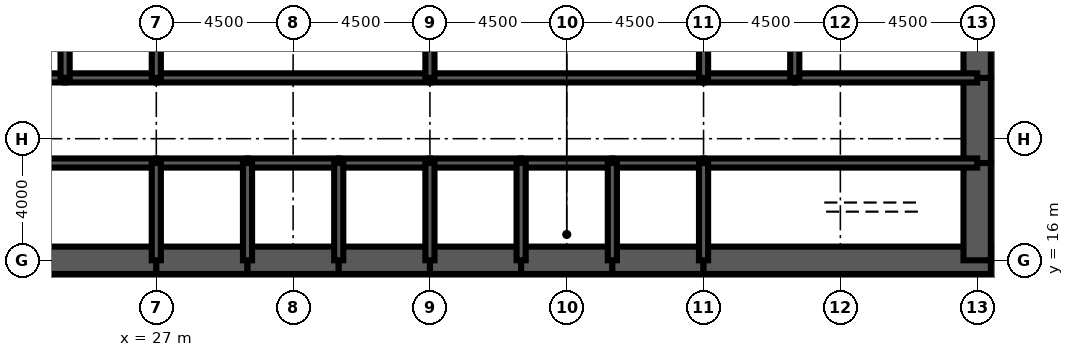
"""IFC4 building model, lengths in metres.
Left out: names, types, materials, properties, quantities, classifications, styles, units other than length and angle.
Written with IfcOpenShell. Run it as: python <this file> out.ifc"""

import sys

from ifc_helpers import new_model, si_unit, direction, frame, frame_2d, origin, place, context, subcontext, project, spatial, rectangle, extrude, element, fill, save


model = new_model("IFC4")
c1 = context("Model", 3, precision=1e-05, world=origin(), true_north=direction((0.0, 1.0)))
c2 = subcontext(c1, "Body", "Model", "MODEL_VIEW")
j1 = project(units=[si_unit("LENGTHUNIT", "METRE"), si_unit("PLANEANGLEUNIT", "RADIAN")], contexts=[c1])
p1 = place(None, origin())
s1 = spatial("IfcSite", under=j1, at=p1, CompositionType="ELEMENT")
p2 = place(p1, origin())
s2 = spatial("IfcBuilding", under=s1, at=p2, CompositionType="ELEMENT")
p3 = place(p2, frame((0.0, 0.0, 134.1)))
s3 = spatial("IfcBuildingStorey", under=s2, at=p3, CompositionType="ELEMENT", Elevation=134.1)
p4 = place(p3, frame((17.55, 16.0, 0.0), z_axis=(0.0, 0.0, 1.0), x_axis=(1.0, 0.0, 0.0)))
e1 = element("IfcWall", 1, at=p4, inside=s3, PredefinedType="SHEAR", context=c2, shape_type="SweptSolid", body=[
    extrude(rectangle(XDim=9.45, YDim=0.9, at=frame_2d((4.725, 0.0))), origin(), (0.0, 0.0, 1.0), 4.2),
])
for number, where, z_axis, x_axis in (
    (2, (27.0, 16.0, 0.0), (0.0, 0.0, 1.0), (1.0, 0.0, 0.0)),
    (3, (30.0, 16.0, 0.0), (0.0, 0.0, 1.0), (1.0, 0.0, 0.0)),
    (4, (33.0, 16.0, 0.0), (0.0, 0.0, 1.0), (1.0, 0.0, 0.0)),
    (5, (36.0, 16.0, 0.0), (0.0, 0.0, 1.0), (1.0, 0.0, 0.0)),
    (6, (39.0, 16.0, 0.0), (0.0, 0.0, 1.0), (1.0, 0.0, 0.0)),
    (7, (42.0, 16.0, 0.0), (0.0, 0.0, 1.0), (1.0, 0.0, 0.0)),
):
    element("IfcWall", number, at=place(p3, frame(where, z_axis=z_axis, x_axis=x_axis)), inside=s3, PredefinedType="SHEAR", context=c2, shape_type="SweptSolid", body=[
        extrude(rectangle(XDim=3.0, YDim=0.9, at=frame_2d((1.5, 0.0))), origin(), (0.0, 0.0, 1.0), 4.2),
    ])
p5 = place(p3, frame((45.0, 16.0, 0.0), z_axis=(0.0, 0.0, 1.0), x_axis=(1.0, 0.0, 0.0)))
e8 = element("IfcWall", 8, at=p5, inside=s3, PredefinedType="SHEAR", context=c2, shape_type="SweptSolid", body=[
    extrude(rectangle(XDim=9.45, YDim=0.9, at=frame_2d((4.725, 0.0))), origin(), (0.0, 0.0, 1.0), 4.2),
])
p6 = place(p3, frame((54.0, 16.0, 0.0), z_axis=(0.0, 0.0, 1.0), x_axis=(0.0, 1.0, 0.0)))
e9 = element("IfcWall", 9, at=p6, inside=s3, PredefinedType="SHEAR", context=c2, shape_type="SweptSolid", body=[
    extrude(rectangle(XDim=3.2, YDim=0.9, at=frame_2d((1.6, 0.0))), origin(), (0.0, 0.0, 1.0), 4.2),
])
p7 = place(p3, frame((54.0, 19.2, 0.0), z_axis=(0.0, 0.0, 1.0), x_axis=(0.0, 1.0, 0.0)))
e10 = element("IfcWall", 10, at=p7, inside=s3, PredefinedType="SHEAR", context=c2, shape_type="SweptSolid", body=[
    extrude(rectangle(XDim=2.8, YDim=0.9, at=frame_2d((1.4, 0.0))), origin(), (0.0, 0.0, 1.0), 4.2),
])
p8 = place(p7, frame((0.4, 0.0, 0.0)))
e11 = element("IfcOpeningElement", 11, at=p8, cuts=e10, PredefinedType="OPENING", context=c2, shape_type="SweptSolid", body=[
    extrude(rectangle(XDim=1.8, YDim=2.1, at=frame_2d((0.9, 1.05))), frame((0.0, 0.46, 0.0), z_axis=(0.0, -1.0, 0.0), x_axis=(1.0, 0.0, 0.0)), (0.0, 0.0, 1.0), 0.92),
])
p9 = place(p3, frame((54.0, 22.0, 0.0), z_axis=(0.0, 0.0, 1.0), x_axis=(0.0, 1.0, 0.0)))
e12 = element("IfcWall", 12, at=p9, inside=s3, PredefinedType="SHEAR", context=c2, shape_type="SweptSolid", body=[
    extrude(rectangle(XDim=4.0, YDim=0.9, at=frame_2d((2.0, 0.0))), origin(), (0.0, 0.0, 1.0), 4.2),
])
p10 = place(p3, frame((18.0, 19.2, 0.0), z_axis=(0.0, 0.0, 1.0), x_axis=(1.0, 0.0, 0.0)))
e13 = element("IfcWall", 13, at=p10, inside=s3, PredefinedType="SOLIDWALL", context=c2, shape_type="SweptSolid", body=[
    extrude(rectangle(XDim=9.0, YDim=0.3, at=frame_2d((4.5, 0.0))), origin(), (0.0, 0.0, 1.0), 4.2),
])
p11 = place(p10, frame((0.65, 0.0, 0.0)))
e14 = element("IfcOpeningElement", 14, at=p11, cuts=e13, PredefinedType="OPENING", context=c2, shape_type="SweptSolid", body=[
    extrude(rectangle(XDim=1.0, YDim=2.1, at=frame_2d((0.5, 1.05))), frame((0.0, 0.16, 0.0), z_axis=(0.0, -1.0, 0.0), x_axis=(1.0, 0.0, 0.0)), (0.0, 0.0, 1.0), 0.32),
])
p12 = place(p3, frame((27.0, 19.2, 0.0), z_axis=(0.0, 0.0, 1.0), x_axis=(1.0, 0.0, 0.0)))
e15 = element("IfcWall", 15, at=p12, inside=s3, PredefinedType="SOLIDWALL", context=c2, shape_type="SweptSolid", body=[
    extrude(rectangle(XDim=3.0, YDim=0.3, at=frame_2d((1.5, 0.0))), origin(), (0.0, 0.0, 1.0), 4.2),
])
p13 = place(p12, frame((0.95, 0.0, 0.0)))
e16 = element("IfcOpeningElement", 16, at=p13, cuts=e15, PredefinedType="OPENING", context=c2, shape_type="SweptSolid", body=[
    extrude(rectangle(XDim=1.1, YDim=2.2, at=frame_2d((0.55, 1.1))), frame((0.0, 0.16, 0.0), z_axis=(0.0, -1.0, 0.0), x_axis=(1.0, 0.0, 0.0)), (0.0, 0.0, 1.0), 0.32),
])
p14 = place(p3, frame((30.0, 19.2, 0.0), z_axis=(0.0, 0.0, 1.0), x_axis=(1.0, 0.0, 0.0)))
e17 = element("IfcWall", 17, at=p14, inside=s3, PredefinedType="SOLIDWALL", context=c2, shape_type="SweptSolid", body=[
    extrude(rectangle(XDim=3.0, YDim=0.3, at=frame_2d((1.5, 0.0))), origin(), (0.0, 0.0, 1.0), 4.2),
])
p15 = place(p14, frame((0.95, 0.0, 0.0)))
e18 = element("IfcOpeningElement", 18, at=p15, cuts=e17, PredefinedType="OPENING", context=c2, shape_type="SweptSolid", body=[
    extrude(rectangle(XDim=1.1, YDim=2.2, at=frame_2d((0.55, 1.1))), frame((0.0, 0.16, 0.0), z_axis=(0.0, -1.0, 0.0), x_axis=(1.0, 0.0, 0.0)), (0.0, 0.0, 1.0), 0.32),
])
p16 = place(p3, frame((33.0, 19.2, 0.0), z_axis=(0.0, 0.0, 1.0), x_axis=(1.0, 0.0, 0.0)))
e19 = element("IfcWall", 19, at=p16, inside=s3, PredefinedType="SOLIDWALL", context=c2, shape_type="SweptSolid", body=[
    extrude(rectangle(XDim=3.0, YDim=0.3, at=frame_2d((1.5, 0.0))), origin(), (0.0, 0.0, 1.0), 4.2),
])
p17 = place(p16, frame((0.95, 0.0, 0.0)))
e20 = element("IfcOpeningElement", 20, at=p17, cuts=e19, PredefinedType="OPENING", context=c2, shape_type="SweptSolid", body=[
    extrude(rectangle(XDim=1.1, YDim=2.2, at=frame_2d((0.55, 1.1))), frame((0.0, 0.16, 0.0), z_axis=(0.0, -1.0, 0.0), x_axis=(1.0, 0.0, 0.0)), (0.0, 0.0, 1.0), 0.32),
])
p18 = place(p3, frame((36.0, 19.2, 0.0), z_axis=(0.0, 0.0, 1.0), x_axis=(1.0, 0.0, 0.0)))
e21 = element("IfcWall", 21, at=p18, inside=s3, PredefinedType="SOLIDWALL", context=c2, shape_type="SweptSolid", body=[
    extrude(rectangle(XDim=3.0, YDim=0.3, at=frame_2d((1.5, 0.0))), origin(), (0.0, 0.0, 1.0), 4.2),
])
p19 = place(p18, frame((0.95, 0.0, 0.0)))
e22 = element("IfcOpeningElement", 22, at=p19, cuts=e21, PredefinedType="OPENING", context=c2, shape_type="SweptSolid", body=[
    extrude(rectangle(XDim=1.1, YDim=2.2, at=frame_2d((0.55, 1.1))), frame((0.0, 0.16, 0.0), z_axis=(0.0, -1.0, 0.0), x_axis=(1.0, 0.0, 0.0)), (0.0, 0.0, 1.0), 0.32),
])
p20 = place(p3, frame((39.0, 19.2, 0.0), z_axis=(0.0, 0.0, 1.0), x_axis=(1.0, 0.0, 0.0)))
e23 = element("IfcWall", 23, at=p20, inside=s3, PredefinedType="SOLIDWALL", context=c2, shape_type="SweptSolid", body=[
    extrude(rectangle(XDim=3.0, YDim=0.3, at=frame_2d((1.5, 0.0))), origin(), (0.0, 0.0, 1.0), 4.2),
])
p21 = place(p20, frame((1.0, 0.0, 0.0)))
e24 = element("IfcOpeningElement", 24, at=p21, cuts=e23, PredefinedType="OPENING", context=c2, shape_type="SweptSolid", body=[
    extrude(rectangle(XDim=1.0, YDim=2.1, at=frame_2d((0.5, 1.05))), frame((0.0, 0.16, 0.0), z_axis=(0.0, -1.0, 0.0), x_axis=(1.0, 0.0, 0.0)), (0.0, 0.0, 1.0), 0.32),
])
p22 = place(p3, frame((42.0, 19.2, 0.0), z_axis=(0.0, 0.0, 1.0), x_axis=(1.0, 0.0, 0.0)))
e25 = element("IfcWall", 25, at=p22, inside=s3, PredefinedType="SOLIDWALL", context=c2, shape_type="SweptSolid", body=[
    extrude(rectangle(XDim=3.0, YDim=0.3, at=frame_2d((1.5, 0.0))), origin(), (0.0, 0.0, 1.0), 4.2),
])
p23 = place(p3, frame((45.0, 19.2, 0.0), z_axis=(0.0, 0.0, 1.0), x_axis=(1.0, 0.0, 0.0)))
e26 = element("IfcWall", 26, at=p23, inside=s3, PredefinedType="SOLIDWALL", context=c2, shape_type="SweptSolid", body=[
    extrude(rectangle(XDim=9.0, YDim=0.3, at=frame_2d((4.5, 0.0))), origin(), (0.0, 0.0, 1.0), 4.2),
])
p24 = place(p23, frame((7.35, 0.0, 0.0)))
e27 = element("IfcOpeningElement", 27, at=p24, cuts=e26, PredefinedType="OPENING", context=c2, shape_type="SweptSolid", body=[
    extrude(rectangle(XDim=1.0, YDim=2.1, at=frame_2d((0.5, 1.05))), frame((0.0, 0.16, 0.0), z_axis=(0.0, -1.0, 0.0), x_axis=(1.0, 0.0, 0.0)), (0.0, 0.0, 1.0), 0.32),
])
p25 = place(p3, frame((18.0, 22.0, 0.0), z_axis=(0.0, 0.0, 1.0), x_axis=(1.0, 0.0, 0.0)))
e28 = element("IfcWall", 28, at=p25, inside=s3, PredefinedType="SOLIDWALL", context=c2, shape_type="SweptSolid", body=[
    extrude(rectangle(XDim=6.0, YDim=0.3, at=frame_2d((3.0, 0.0))), origin(), (0.0, 0.0, 1.0), 4.2),
])
p26 = place(p25, frame((4.4, 0.0, 0.0)))
e29 = element("IfcOpeningElement", 29, at=p26, cuts=e28, PredefinedType="OPENING", context=c2, shape_type="SweptSolid", body=[
    extrude(rectangle(XDim=1.0, YDim=2.1, at=frame_2d((0.5, 1.05))), frame((0.0, 0.16, 0.0), z_axis=(0.0, -1.0, 0.0), x_axis=(1.0, 0.0, 0.0)), (0.0, 0.0, 1.0), 0.32),
])
p27 = place(p25, frame((0.7, 0.0, 0.0)))
e30 = element("IfcOpeningElement", 30, at=p27, cuts=e28, PredefinedType="OPENING", context=c2, shape_type="SweptSolid", body=[
    extrude(rectangle(XDim=1.0, YDim=2.1, at=frame_2d((0.5, 1.05))), frame((0.0, 0.16, 0.0), z_axis=(0.0, -1.0, 0.0), x_axis=(1.0, 0.0, 0.0)), (0.0, 0.0, 1.0), 0.32),
])
p28 = place(p3, frame((24.0, 22.0, 0.0), z_axis=(0.0, 0.0, 1.0), x_axis=(1.0, 0.0, 0.0)))
e31 = element("IfcWall", 31, at=p28, inside=s3, PredefinedType="SOLIDWALL", context=c2, shape_type="SweptSolid", body=[
    extrude(rectangle(XDim=3.0, YDim=0.3, at=frame_2d((1.5, 0.0))), origin(), (0.0, 0.0, 1.0), 4.2),
])
p29 = place(p28, frame((1.0, 0.0, 0.0)))
e32 = element("IfcOpeningElement", 32, at=p29, cuts=e31, PredefinedType="OPENING", context=c2, shape_type="SweptSolid", body=[
    extrude(rectangle(XDim=1.0, YDim=2.1, at=frame_2d((0.5, 1.05))), frame((0.0, 0.16, 0.0), z_axis=(0.0, -1.0, 0.0), x_axis=(1.0, 0.0, 0.0)), (0.0, 0.0, 1.0), 0.32),
])
p30 = place(p3, frame((27.0, 22.0, 0.0), z_axis=(0.0, 0.0, 1.0), x_axis=(1.0, 0.0, 0.0)))
e33 = element("IfcWall", 33, at=p30, inside=s3, PredefinedType="SOLIDWALL", context=c2, shape_type="SweptSolid", body=[
    extrude(rectangle(XDim=9.0, YDim=0.3, at=frame_2d((4.5, 0.0))), origin(), (0.0, 0.0, 1.0), 4.2),
])
p31 = place(p30, frame((4.0, 0.0, 0.0)))
e34 = element("IfcOpeningElement", 34, at=p31, cuts=e33, PredefinedType="OPENING", context=c2, shape_type="SweptSolid", body=[
    extrude(rectangle(XDim=1.0, YDim=2.1, at=frame_2d((0.5, 1.05))), frame((0.0, 0.16, 0.0), z_axis=(0.0, -1.0, 0.0), x_axis=(1.0, 0.0, 0.0)), (0.0, 0.0, 1.0), 0.32),
])
p32 = place(p3, frame((36.0, 22.0, 0.0), z_axis=(0.0, 0.0, 1.0), x_axis=(1.0, 0.0, 0.0)))
e35 = element("IfcWall", 35, at=p32, inside=s3, PredefinedType="SOLIDWALL", context=c2, shape_type="SweptSolid", body=[
    extrude(rectangle(XDim=9.0, YDim=0.3, at=frame_2d((4.5, 0.0))), origin(), (0.0, 0.0, 1.0), 4.2),
])
p33 = place(p32, frame((4.0, 0.0, 0.0)))
e36 = element("IfcOpeningElement", 36, at=p33, cuts=e35, PredefinedType="OPENING", context=c2, shape_type="SweptSolid", body=[
    extrude(rectangle(XDim=1.0, YDim=2.1, at=frame_2d((0.5, 1.05))), frame((0.0, 0.16, 0.0), z_axis=(0.0, -1.0, 0.0), x_axis=(1.0, 0.0, 0.0)), (0.0, 0.0, 1.0), 0.32),
])
p34 = place(p3, frame((45.0, 22.0, 0.0), z_axis=(0.0, 0.0, 1.0), x_axis=(1.0, 0.0, 0.0)))
e37 = element("IfcWall", 37, at=p34, inside=s3, PredefinedType="SOLIDWALL", context=c2, shape_type="SweptSolid", body=[
    extrude(rectangle(XDim=3.0, YDim=0.3, at=frame_2d((1.5, 0.0))), origin(), (0.0, 0.0, 1.0), 4.2),
])
p35 = place(p34, frame((1.0, 0.0, 0.0)))
e38 = element("IfcOpeningElement", 38, at=p35, cuts=e37, PredefinedType="OPENING", context=c2, shape_type="SweptSolid", body=[
    extrude(rectangle(XDim=1.0, YDim=2.1, at=frame_2d((0.5, 1.05))), frame((0.0, 0.16, 0.0), z_axis=(0.0, -1.0, 0.0), x_axis=(1.0, 0.0, 0.0)), (0.0, 0.0, 1.0), 0.32),
])
p36 = place(p3, frame((48.0, 22.0, 0.0), z_axis=(0.0, 0.0, 1.0), x_axis=(1.0, 0.0, 0.0)))
e39 = element("IfcWall", 39, at=p36, inside=s3, PredefinedType="SOLIDWALL", context=c2, shape_type="SweptSolid", body=[
    extrude(rectangle(XDim=6.0, YDim=0.3, at=frame_2d((3.0, 0.0))), origin(), (0.0, 0.0, 1.0), 4.2),
])
p37 = place(p36, frame((2.0, 0.0, 0.0)))
e40 = element("IfcOpeningElement", 40, at=p37, cuts=e39, PredefinedType="OPENING", context=c2, shape_type="SweptSolid", body=[
    extrude(rectangle(XDim=1.0, YDim=2.1, at=frame_2d((0.5, 1.05))), frame((0.0, 0.16, 0.0), z_axis=(0.0, -1.0, 0.0), x_axis=(1.0, 0.0, 0.0)), (0.0, 0.0, 1.0), 0.32),
])
p38 = place(p36, frame((4.0, 0.0, 0.0)))
e41 = element("IfcOpeningElement", 41, at=p38, cuts=e39, PredefinedType="OPENING", context=c2, shape_type="SweptSolid", body=[
    extrude(rectangle(XDim=1.0, YDim=2.1, at=frame_2d((0.5, 1.05))), frame((0.0, 0.16, 0.0), z_axis=(0.0, -1.0, 0.0), x_axis=(1.0, 0.0, 0.0)), (0.0, 0.0, 1.0), 0.32),
])
for number, where, z_axis, x_axis in (
    (42, (27.0, 16.0, 0.0), (0.0, 0.0, 1.0), (0.0, 1.0, 0.0)),
    (43, (30.0, 16.0, 0.0), (0.0, 0.0, 1.0), (0.0, 1.0, 0.0)),
    (44, (33.0, 16.0, 0.0), (0.0, 0.0, 1.0), (0.0, 1.0, 0.0)),
    (45, (36.0, 16.0, 0.0), (0.0, 0.0, 1.0), (0.0, 1.0, 0.0)),
    (46, (39.0, 16.0, 0.0), (0.0, 0.0, 1.0), (0.0, 1.0, 0.0)),
    (47, (42.0, 16.0, 0.0), (0.0, 0.0, 1.0), (0.0, 1.0, 0.0)),
    (48, (45.0, 16.0, 0.0), (0.0, 0.0, 1.0), (0.0, 1.0, 0.0)),
):
    element("IfcWall", number, at=place(p3, frame(where, z_axis=z_axis, x_axis=x_axis)), inside=s3, PredefinedType="SOLIDWALL", context=c2, shape_type="SweptSolid", body=[
        extrude(rectangle(XDim=3.2, YDim=0.3, at=frame_2d((1.6, 0.0))), origin(), (0.0, 0.0, 1.0), 4.2),
    ])
for number, where, z_axis, x_axis in (
    (49, (24.0, 22.0, 0.0), (0.0, 0.0, 1.0), (0.0, 1.0, 0.0)),
    (50, (27.0, 22.0, 0.0), (0.0, 0.0, 1.0), (0.0, 1.0, 0.0)),
    (51, (36.0, 22.0, 0.0), (0.0, 0.0, 1.0), (0.0, 1.0, 0.0)),
    (52, (45.0, 22.0, 0.0), (0.0, 0.0, 1.0), (0.0, 1.0, 0.0)),
    (53, (48.0, 22.0, 0.0), (0.0, 0.0, 1.0), (0.0, 1.0, 0.0)),
):
    element("IfcWall", number, at=place(p3, frame(where, z_axis=z_axis, x_axis=x_axis)), inside=s3, PredefinedType="SOLIDWALL", context=c2, shape_type="SweptSolid", body=[
        extrude(rectangle(XDim=4.0, YDim=0.3, at=frame_2d((2.0, 0.0))), origin(), (0.0, 0.0, 1.0), 4.2),
    ])
p39 = place(p3, frame((39.15, 17.4, 0.0), z_axis=(0.0, 0.0, 1.0), x_axis=(1.0, 0.0, 0.0)))
e54 = element("IfcWall", 54, at=p39, inside=s3, PredefinedType="SOLIDWALL", context=c2, shape_type="SweptSolid", body=[
    extrude(rectangle(XDim=2.7, YDim=0.3, at=frame_2d((1.35, 0.0))), origin(), (0.0, 0.0, 1.0), 4.04),
])
p40 = place(p39, frame((0.85, 0.0, 0.0)))
e55 = element("IfcOpeningElement", 55, at=p40, cuts=e54, PredefinedType="OPENING", context=c2, shape_type="SweptSolid", body=[
    extrude(rectangle(XDim=1.0, YDim=2.1, at=frame_2d((0.5, 1.05))), frame((0.0, 0.16, 0.0), z_axis=(0.0, -1.0, 0.0), x_axis=(1.0, 0.0, 0.0)), (0.0, 0.0, 1.0), 0.32),
])
p41 = place(p3, frame((51.375, 22.15, 0.0), z_axis=(0.0, 0.0, 1.0), x_axis=(0.0, 1.0, 0.0)))
e56 = element("IfcWall", 56, at=p41, inside=s3, PredefinedType="PARTITIONING", context=c2, shape_type="SweptSolid", body=[
    extrude(rectangle(XDim=3.7, YDim=0.15, at=frame_2d((1.85, 0.0))), origin(), (0.0, 0.0, 1.0), 3.0),
])
p42 = place(p3, frame((24.5, 19.35, 0.0), z_axis=(0.0, 0.0, 1.0), x_axis=(0.0, 1.0, 0.0)))
e57 = element("IfcWall", 57, at=p42, inside=s3, PredefinedType="PARTITIONING", context=c2, shape_type="SweptSolid", body=[
    extrude(rectangle(XDim=2.5, YDim=0.15, at=frame_2d((1.25, 0.0))), origin(), (0.0, 0.0, 1.0), 3.0),
])
p43 = place(p42, frame((1.15, 0.0, 0.0)))
e58 = element("IfcOpeningElement", 58, at=p43, cuts=e57, PredefinedType="OPENING", context=c2, shape_type="SweptSolid", body=[
    extrude(rectangle(XDim=1.0, YDim=2.1, at=frame_2d((0.5, 1.05))), frame((0.0, 0.085, 0.0), z_axis=(0.0, -1.0, 0.0), x_axis=(1.0, 0.0, 0.0)), (0.0, 0.0, 1.0), 0.17),
])
p44 = place(p40, origin())
e59 = element("IfcDoor", 59, at=p44, inside=s3, OperationType="SINGLE_SWING_LEFT", PredefinedType="DOOR", context=c2, shape_type="SweptSolid", body=[
    extrude(rectangle(XDim=1.0, YDim=2.1, at=frame_2d((0.5, 1.05))), frame((0.0, 0.025, 0.0), z_axis=(0.0, -1.0, 0.0), x_axis=(1.0, 0.0, 0.0)), (0.0, 0.0, 1.0), 0.05),
])
fill(e55, e59)
p45 = place(p43, origin())
e60 = element("IfcDoor", 60, at=p45, inside=s3, OperationType="SINGLE_SWING_RIGHT", PredefinedType="DOOR", context=c2, shape_type="SweptSolid", body=[
    extrude(rectangle(XDim=1.0, YDim=2.1, at=frame_2d((0.5, 1.05))), frame((0.0, 0.025, 0.0), z_axis=(0.0, -1.0, 0.0), x_axis=(1.0, 0.0, 0.0)), (0.0, 0.0, 1.0), 0.05),
])
fill(e58, e60)
p46 = place(p13, origin())
e61 = element("IfcDoor", 61, at=p46, inside=s3, OperationType="DOUBLE_DOOR_SLIDING", PredefinedType="USERDEFINED", context=c2, shape_type="SweptSolid", body=[
    extrude(rectangle(XDim=1.1, YDim=2.2, at=frame_2d((0.55, 1.1))), frame((0.0, 0.025, 0.0), z_axis=(0.0, -1.0, 0.0), x_axis=(1.0, 0.0, 0.0)), (0.0, 0.0, 1.0), 0.05),
])
fill(e16, e61)
p47 = place(p15, origin())
e62 = element("IfcDoor", 62, at=p47, inside=s3, OperationType="DOUBLE_DOOR_SLIDING", PredefinedType="USERDEFINED", context=c2, shape_type="SweptSolid", body=[
    extrude(rectangle(XDim=1.1, YDim=2.2, at=frame_2d((0.55, 1.1))), frame((0.0, 0.025, 0.0), z_axis=(0.0, -1.0, 0.0), x_axis=(1.0, 0.0, 0.0)), (0.0, 0.0, 1.0), 0.05),
])
fill(e18, e62)
p48 = place(p17, origin())
e63 = element("IfcDoor", 63, at=p48, inside=s3, OperationType="DOUBLE_DOOR_SLIDING", PredefinedType="USERDEFINED", context=c2, shape_type="SweptSolid", body=[
    extrude(rectangle(XDim=1.1, YDim=2.2, at=frame_2d((0.55, 1.1))), frame((0.0, 0.025, 0.0), z_axis=(0.0, -1.0, 0.0), x_axis=(1.0, 0.0, 0.0)), (0.0, 0.0, 1.0), 0.05),
])
fill(e20, e63)
p49 = place(p19, origin())
e64 = element("IfcDoor", 64, at=p49, inside=s3, OperationType="DOUBLE_DOOR_SLIDING", PredefinedType="USERDEFINED", context=c2, shape_type="SweptSolid", body=[
    extrude(rectangle(XDim=1.1, YDim=2.2, at=frame_2d((0.55, 1.1))), frame((0.0, 0.025, 0.0), z_axis=(0.0, -1.0, 0.0), x_axis=(1.0, 0.0, 0.0)), (0.0, 0.0, 1.0), 0.05),
])
fill(e22, e64)
p50 = place(p24, origin())
e65 = element("IfcDoor", 65, at=p50, inside=s3, OperationType="SINGLE_SWING_RIGHT", PredefinedType="DOOR", context=c2, shape_type="SweptSolid", body=[
    extrude(rectangle(XDim=1.0, YDim=2.1, at=frame_2d((0.5, 1.05))), frame((0.0, 0.025, 0.0), z_axis=(0.0, -1.0, 0.0), x_axis=(1.0, 0.0, 0.0)), (0.0, 0.0, 1.0), 0.05),
])
fill(e27, e65)
p51 = place(p8, origin())
e66 = element("IfcDoor", 66, at=p51, inside=s3, OperationType="SINGLE_SWING_LEFT", PredefinedType="DOOR", context=c2, shape_type="SweptSolid", body=[
    extrude(rectangle(XDim=1.8, YDim=2.1, at=frame_2d((0.9, 1.05))), frame((0.0, 0.45, 0.0), z_axis=(0.0, -1.0, 0.0), x_axis=(1.0, 0.0, 0.0)), (0.0, 0.0, 1.0), 0.899),
])
fill(e11, e66)
p52 = place(p29, origin())
e67 = element("IfcDoor", 67, at=p52, inside=s3, OperationType="SINGLE_SWING_LEFT", PredefinedType="DOOR", context=c2, shape_type="SweptSolid", body=[
    extrude(rectangle(XDim=1.0, YDim=2.1, at=frame_2d((0.5, 1.05))), frame((0.0, 0.025, 0.0), z_axis=(0.0, -1.0, 0.0), x_axis=(1.0, 0.0, 0.0)), (0.0, 0.0, 1.0), 0.05),
])
fill(e32, e67)
p53 = place(p31, origin())
e68 = element("IfcDoor", 68, at=p53, inside=s3, OperationType="SINGLE_SWING_LEFT", PredefinedType="DOOR", context=c2, shape_type="SweptSolid", body=[
    extrude(rectangle(XDim=1.0, YDim=2.1, at=frame_2d((0.5, 1.05))), frame((0.0, 0.025, 0.0), z_axis=(0.0, -1.0, 0.0), x_axis=(1.0, 0.0, 0.0)), (0.0, 0.0, 1.0), 0.05),
])
fill(e34, e68)
p54 = place(p33, origin())
e69 = element("IfcDoor", 69, at=p54, inside=s3, OperationType="SINGLE_SWING_LEFT", PredefinedType="DOOR", context=c2, shape_type="SweptSolid", body=[
    extrude(rectangle(XDim=1.0, YDim=2.1, at=frame_2d((0.5, 1.05))), frame((0.0, 0.025, 0.0), z_axis=(0.0, -1.0, 0.0), x_axis=(1.0, 0.0, 0.0)), (0.0, 0.0, 1.0), 0.05),
])
fill(e36, e69)
p55 = place(p35, origin())
e70 = element("IfcDoor", 70, at=p55, inside=s3, OperationType="SINGLE_SWING_LEFT", PredefinedType="DOOR", context=c2, shape_type="SweptSolid", body=[
    extrude(rectangle(XDim=1.0, YDim=2.1, at=frame_2d((0.5, 1.05))), frame((0.0, 0.025, 0.0), z_axis=(0.0, -1.0, 0.0), x_axis=(1.0, 0.0, 0.0)), (0.0, 0.0, 1.0), 0.05),
])
fill(e38, e70)
p56 = place(p37, origin())
e71 = element("IfcDoor", 71, at=p56, inside=s3, OperationType="SINGLE_SWING_LEFT", PredefinedType="DOOR", context=c2, shape_type="SweptSolid", body=[
    extrude(rectangle(XDim=1.0, YDim=2.1, at=frame_2d((0.5, 1.05))), frame((0.0, 0.025, 0.0), z_axis=(0.0, -1.0, 0.0), x_axis=(1.0, 0.0, 0.0)), (0.0, 0.0, 1.0), 0.05),
])
fill(e40, e71)
p57 = place(p38, origin())
e72 = element("IfcDoor", 72, at=p57, inside=s3, OperationType="SINGLE_SWING_RIGHT", PredefinedType="DOOR", context=c2, shape_type="SweptSolid", body=[
    extrude(rectangle(XDim=1.0, YDim=2.1, at=frame_2d((0.5, 1.05))), frame((0.0, 0.025, 0.0), z_axis=(0.0, -1.0, 0.0), x_axis=(1.0, 0.0, 0.0)), (0.0, 0.0, 1.0), 0.05),
])
fill(e41, e72)
p58 = place(p21, origin())
e73 = element("IfcDoor", 73, at=p58, inside=s3, OperationType="SINGLE_SWING_LEFT", PredefinedType="DOOR", context=c2, shape_type="SweptSolid", body=[
    extrude(rectangle(XDim=1.0, YDim=2.1, at=frame_2d((0.5, 1.05))), frame((0.0, 0.025, 0.0), z_axis=(0.0, -1.0, 0.0), x_axis=(1.0, 0.0, 0.0)), (0.0, 0.0, 1.0), 0.05),
])
fill(e24, e73)
save(model, sys.argv[1])
